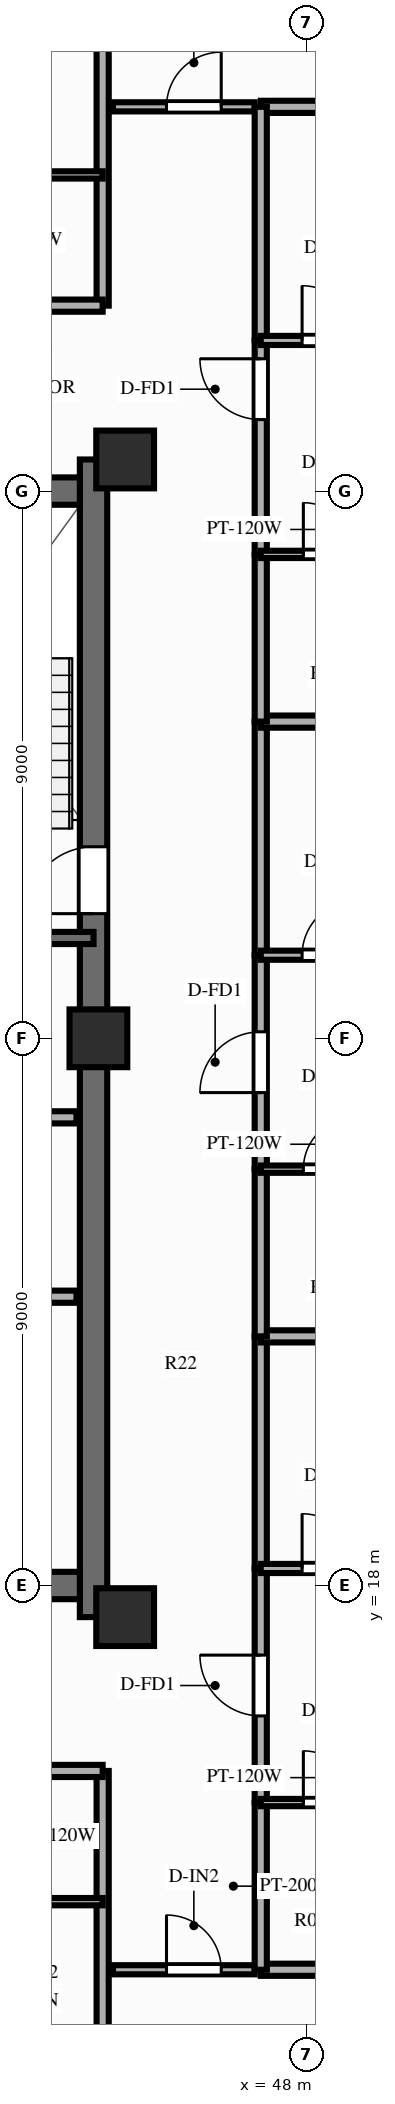
"""IFC4 building model, lengths in metres.
Left out: names, types, materials, properties, quantities, classifications, styles, units other than length and angle.
Written with IfcOpenShell. Run it as: python <this file> out.ifc"""

import sys

from ifc_helpers import new_model, si_unit, direction, frame, frame_2d, origin, origin_2d, place, context, subcontext, project, spatial, rectangle, extrude, source, transform, mapped, element, fill, save


model = new_model("IFC4")
c1 = context("Model", 3, precision=1e-05, world=origin(), true_north=direction((0.0, 1.0)))
c2 = subcontext(c1, "Body", "Model", "MODEL_VIEW")
j1 = project(units=[si_unit("LENGTHUNIT", "METRE"), si_unit("PLANEANGLEUNIT", "RADIAN")], contexts=[c1])
p1 = place(None, origin())
s1 = spatial("IfcSite", under=j1, at=p1, CompositionType="ELEMENT")
p2 = place(p1, origin())
s2 = spatial("IfcBuilding", under=s1, at=p2, CompositionType="ELEMENT")
p3 = place(p2, frame((0.0, 0.0, 236.1)))
s3 = spatial("IfcBuildingStorey", under=s2, at=p3, CompositionType="ELEMENT", Elevation=236.1)
p4 = place(p3, frame((44.5, 17.48, 0.0), z_axis=(0.0, 0.0, 1.0), x_axis=(0.0, 1.0, 0.0)))
e1 = element("IfcWall", 1, at=p4, inside=s3, PredefinedType="SHEAR", context=c2, shape_type="SweptSolid", body=[
    extrude(rectangle(XDim=19.04, YDim=0.45, at=frame_2d((9.52, 0.0))), origin(), (0.0, 0.0, 1.0), 3.9),
])
p5 = place(p4, frame((12.67, 0.0, 0.0), z_axis=(0.0, 0.0, 1.0), x_axis=(-1.0, 0.0, 0.0)))
e2 = element("IfcOpeningElement", 2, at=p5, cuts=e1, PredefinedType="OPENING", context=c2, shape_type="SweptSolid", body=[
    extrude(rectangle(XDim=1.1, YDim=2.15, at=frame_2d((0.55, 1.075))), frame((0.0, 0.237, 0.0), z_axis=(0.0, -1.0, 0.0), x_axis=(1.0, 0.0, 0.0)), (0.0, 0.0, 1.0), 0.474),
])
p6 = place(p3, frame((31.725, 18.0, 0.0), z_axis=(0.0, 0.0, 1.0), x_axis=(1.0, 0.0, 0.0)))
e3 = element("IfcWall", 3, at=p6, inside=s3, PredefinedType="SHEAR", context=c2, shape_type="SweptSolid", body=[
    extrude(rectangle(XDim=12.55, YDim=0.45, at=frame_2d((6.275, 0.0))), origin(), (0.0, 0.0, 1.0), 3.9),
])
p7 = place(p3, frame((31.725, 36.0, 0.0), z_axis=(0.0, 0.0, 1.0), x_axis=(1.0, 0.0, 0.0)))
e4 = element("IfcWall", 4, at=p7, inside=s3, PredefinedType="SHEAR", context=c2, shape_type="SweptSolid", body=[
    extrude(rectangle(XDim=12.55, YDim=0.45, at=frame_2d((6.275, 0.0))), origin(), (0.0, 0.0, 1.0), 3.9),
])
p8 = place(p7, frame((5.225, 0.0, 0.0), z_axis=(0.0, 0.0, 1.0), x_axis=(-1.0, 0.0, 0.0)))
e5 = element("IfcOpeningElement", 5, at=p8, cuts=e4, PredefinedType="OPENING", context=c2, shape_type="SweptSolid", body=[
    extrude(rectangle(XDim=1.4, YDim=2.15, at=frame_2d((0.7, 1.075))), frame((0.0, 0.237, 0.0), z_axis=(0.0, -1.0, 0.0), x_axis=(1.0, 0.0, 0.0)), (0.0, 0.0, 1.0), 0.474),
])
m1 = source(origin(), c2, "Body", "SweptSolid", [
    extrude(rectangle(XDim=0.95, YDim=0.95, at=origin_2d()), origin(), (0.0, 0.0, 1.0), 3.9),
])
for number, where, z_axis, x_axis in (
    (6, (45.02, 17.48, 0.0), (0.0, 0.0, 1.0), (1.0, 0.0, 0.0)),
    (7, (45.02, 36.52, 0.0), (0.0, 0.0, 1.0), (1.0, 0.0, 0.0)),
    (8, (44.58, 27.0, 0.0), (0.0, 0.0, 1.0), (1.0, 0.0, 0.0)),
):
    element("IfcColumn", number, at=place(p3, frame(where, z_axis=z_axis, x_axis=x_axis)), inside=s3, PredefinedType="COLUMN", context=c2, shape_type="MappedRepresentation", body=[
        mapped(m1, transform((0.0, 0.0, 0.0), scale=1.0)),
    ])
p9 = place(p3, frame((41.55, 22.75, 0.0), z_axis=(0.0, 0.0, 1.0), x_axis=(1.0, 0.0, 0.0)))
e9 = element("IfcWall", 9, at=p9, inside=s3, PredefinedType="PARTITIONING", context=c2, shape_type="SweptSolid", body=[
    extrude(rectangle(XDim=2.67, YDim=0.2, at=frame_2d((1.335, 0.0))), origin(), (0.0, 0.0, 1.0), 3.56),
])
p10 = place(p3, frame((41.55, 25.7, 0.0), z_axis=(0.0, 0.0, 1.0), x_axis=(1.0, 0.0, 0.0)))
e10 = element("IfcWall", 10, at=p10, inside=s3, PredefinedType="PARTITIONING", context=c2, shape_type="SweptSolid", body=[
    extrude(rectangle(XDim=2.67, YDim=0.2, at=frame_2d((1.335, 0.0))), origin(), (0.0, 0.0, 1.0), 3.04),
])
p11 = place(p3, frame((40.57, 28.65, 0.0), z_axis=(0.0, 0.0, 1.0), x_axis=(1.0, 0.0, 0.0)))
e11 = element("IfcWall", 11, at=p11, inside=s3, PredefinedType="SOLIDWALL", context=c2, shape_type="SweptSolid", body=[
    extrude(rectangle(XDim=3.93, YDim=0.2, at=frame_2d((1.965, 0.0))), origin(), (0.0, 0.0, 1.0), 3.69),
])
p12 = place(p3, frame((44.82, 11.68, 0.0), z_axis=(0.0, 0.0, 1.0), x_axis=(1.0, 0.0, 0.0)))
e12 = element("IfcWall", 12, at=p12, inside=s3, PredefinedType="PARTITIONING", context=c2, shape_type="SweptSolid", body=[
    extrude(rectangle(XDim=2.33, YDim=0.15, at=frame_2d((1.165, 0.0))), origin(), (0.0, 0.0, 1.0), 2.24),
])
p13 = place(p12, frame((0.88, 0.0, 0.0)))
e13 = element("IfcOpeningElement", 13, at=p13, cuts=e12, PredefinedType="OPENING", context=c2, shape_type="SweptSolid", body=[
    extrude(rectangle(XDim=0.9, YDim=2.1, at=frame_2d((0.45, 1.05))), frame((0.0, 0.087, 0.0), z_axis=(0.0, -1.0, 0.0), x_axis=(1.0, 0.0, 0.0)), (0.0, 0.0, 1.0), 0.174),
])
p14 = place(p3, frame((44.82, 42.32, 0.0), z_axis=(0.0, 0.0, 1.0), x_axis=(1.0, 0.0, 0.0)))
e14 = element("IfcWall", 14, at=p14, inside=s3, PredefinedType="PARTITIONING", context=c2, shape_type="SweptSolid", body=[
    extrude(rectangle(XDim=2.33, YDim=0.15, at=frame_2d((1.165, 0.0))), origin(), (0.0, 0.0, 1.0), 2.24),
])
p15 = place(p14, frame((0.88, 0.0, 0.0)))
e15 = element("IfcOpeningElement", 15, at=p15, cuts=e14, PredefinedType="OPENING", context=c2, shape_type="SweptSolid", body=[
    extrude(rectangle(XDim=0.9, YDim=2.1, at=frame_2d((0.45, 1.05))), frame((0.0, 0.087, 0.0), z_axis=(0.0, -1.0, 0.0), x_axis=(1.0, 0.0, 0.0)), (0.0, 0.0, 1.0), 0.174),
])
p16 = place(p3, frame((44.65, 14.95, 0.0), z_axis=(0.0, 0.0, 1.0), x_axis=(0.0, -1.0, 0.0)))
e16 = element("IfcWall", 16, at=p16, inside=s3, PredefinedType="PARTITIONING", context=c2, shape_type="SweptSolid", body=[
    extrude(rectangle(XDim=8.8, YDim=0.2, at=frame_2d((4.4, 0.0))), origin(), (0.0, 0.0, 1.0), 2.44),
])
p17 = place(p3, frame((41.8, 14.95, 0.0), z_axis=(0.0, 0.0, 1.0), x_axis=(1.0, 0.0, 0.0)))
e17 = element("IfcWall", 17, at=p17, inside=s3, PredefinedType="PARTITIONING", context=c2, shape_type="SweptSolid", body=[
    extrude(rectangle(XDim=2.85, YDim=0.2, at=frame_2d((1.425, 0.0))), origin(), (0.0, 0.0, 1.0), 3.56),
])
p18 = place(p3, frame((41.8, 12.8, 0.0), z_axis=(0.0, 0.0, 1.0), x_axis=(1.0, 0.0, 0.0)))
e18 = element("IfcWall", 18, at=p18, inside=s3, PredefinedType="PARTITIONING", context=c2, shape_type="SweptSolid", body=[
    extrude(rectangle(XDim=2.85, YDim=0.12, at=frame_2d((1.425, 0.0))), origin(), (0.0, 0.0, 1.0), 3.56),
])
p19 = place(p3, frame((44.65, 39.05, 0.0), z_axis=(0.0, 0.0, 1.0), x_axis=(0.0, 1.0, 0.0)))
e19 = element("IfcWall", 19, at=p19, inside=s3, PredefinedType="PARTITIONING", context=c2, shape_type="SweptSolid", body=[
    extrude(rectangle(XDim=8.8, YDim=0.2, at=frame_2d((4.4, 0.0))), origin(), (0.0, 0.0, 1.0), 2.44),
])
p20 = place(p3, frame((42.085, 39.05, 0.0), z_axis=(0.0, 0.0, 1.0), x_axis=(1.0, 0.0, 0.0)))
e20 = element("IfcWall", 20, at=p20, inside=s3, PredefinedType="PARTITIONING", context=c2, shape_type="SweptSolid", body=[
    extrude(rectangle(XDim=2.564, YDim=0.2, at=frame_2d((1.282, 0.0))), origin(), (0.0, 0.0, 1.0), 3.56),
])
p21 = place(p3, frame((42.085, 41.2, 0.0), z_axis=(0.0, 0.0, 1.0), x_axis=(1.0, 0.0, 0.0)))
e21 = element("IfcWall", 21, at=p21, inside=s3, PredefinedType="PARTITIONING", context=c2, shape_type="SweptSolid", body=[
    extrude(rectangle(XDim=2.564, YDim=0.12, at=frame_2d((1.282, 0.0))), origin(), (0.0, 0.0, 1.0), 3.56),
])
for number, where, z_axis, x_axis in (
    (22, (47.25, 11.68, 0.0), (0.0, 0.0, 1.0), (1.0, 0.0, 0.0)),
    (23, (47.25, 42.32, 0.0), (0.0, 0.0, 1.0), (1.0, 0.0, 0.0)),
):
    element("IfcWall", number, at=place(p3, frame(where, z_axis=z_axis, x_axis=x_axis)), inside=s3, PredefinedType="PARTITIONING", context=c2, shape_type="SweptSolid", body=[
        extrude(rectangle(XDim=7.35, YDim=0.2, at=frame_2d((3.675, 0.0))), origin(), (0.0, 0.0, 1.0), 2.24),
    ])
p22 = place(p3, frame((47.25, 11.68, 0.0), z_axis=(0.0, 0.0, 1.0), x_axis=(0.0, 1.0, 0.0)))
e24 = element("IfcWall", 24, at=p22, inside=s3, PredefinedType="PARTITIONING", context=c2, shape_type="SweptSolid", body=[
    extrude(rectangle(XDim=2.75, YDim=0.2, at=frame_2d((1.375, 0.0))), origin(), (0.0, 0.0, 1.0), 2.24),
])
p23 = place(p3, frame((47.25, 14.43, 0.0), z_axis=(0.0, 0.0, 1.0), x_axis=(0.0, 1.0, 0.0)))
e25 = element("IfcWall", 25, at=p23, inside=s3, PredefinedType="PARTITIONING", context=c2, shape_type="SweptSolid", body=[
    extrude(rectangle(XDim=3.85, YDim=0.2, at=frame_2d((1.925, 0.0))), origin(), (0.0, 0.0, 1.0), 2.24),
])
p24 = place(p23, frame((1.425, 0.0, 0.0)))
e26 = element("IfcOpeningElement", 26, at=p24, cuts=e25, PredefinedType="OPENING", context=c2, shape_type="SweptSolid", body=[
    extrude(rectangle(XDim=1.0, YDim=2.15, at=frame_2d((0.5, 1.075))), frame((0.0, 0.112, 0.0), z_axis=(0.0, -1.0, 0.0), x_axis=(1.0, 0.0, 0.0)), (0.0, 0.0, 1.0), 0.224),
])
p25 = place(p3, frame((47.25, 18.28, 0.0), z_axis=(0.0, 0.0, 1.0), x_axis=(0.0, 1.0, 0.0)))
e27 = element("IfcWall", 27, at=p25, inside=s3, PredefinedType="PARTITIONING", context=c2, shape_type="SweptSolid", body=[
    extrude(rectangle(XDim=3.818, YDim=0.2, at=frame_2d((1.909, 0.0))), origin(), (0.0, 0.0, 1.0), 3.56),
])
p26 = place(p3, frame((47.25, 14.43, 0.0), z_axis=(0.0, 0.0, 1.0), x_axis=(1.0, 0.0, 0.0)))
e28 = element("IfcWall", 28, at=p26, inside=s3, PredefinedType="PARTITIONING", context=c2, shape_type="SweptSolid", body=[
    extrude(rectangle(XDim=2.12, YDim=0.12, at=frame_2d((1.06, 0.0))), origin(), (0.0, 0.0, 1.0), 3.56),
])
p27 = place(p26, frame((0.701, 0.0, 0.0)))
e29 = element("IfcOpeningElement", 29, at=p27, cuts=e28, PredefinedType="OPENING", context=c2, shape_type="SweptSolid", body=[
    extrude(rectangle(XDim=0.85, YDim=2.05, at=frame_2d((0.425, 1.025))), frame((0.0, 0.072, 0.0), z_axis=(0.0, -1.0, 0.0), x_axis=(1.0, 0.0, 0.0)), (0.0, 0.0, 1.0), 0.144),
])
p28 = place(p3, frame((47.25, 18.28, 0.0), z_axis=(0.0, 0.0, 1.0), x_axis=(1.0, 0.0, 0.0)))
e30 = element("IfcWall", 30, at=p28, inside=s3, PredefinedType="PARTITIONING", context=c2, shape_type="SweptSolid", body=[
    extrude(rectangle(XDim=3.14, YDim=0.15, at=frame_2d((1.57, 0.0))), origin(), (0.0, 0.0, 1.0), 3.56),
])
p29 = place(p28, frame((0.68, 0.0, 0.0)))
e31 = element("IfcOpeningElement", 31, at=p29, cuts=e30, PredefinedType="OPENING", context=c2, shape_type="SweptSolid", body=[
    extrude(rectangle(XDim=0.9, YDim=2.1, at=frame_2d((0.45, 1.05))), frame((0.0, 0.087, 0.0), z_axis=(0.0, -1.0, 0.0), x_axis=(1.0, 0.0, 0.0)), (0.0, 0.0, 1.0), 0.174),
])
p30 = place(p3, frame((47.25, 22.098, 0.0), z_axis=(0.0, 0.0, 1.0), x_axis=(1.0, 0.0, 0.0)))
e32 = element("IfcWall", 32, at=p30, inside=s3, PredefinedType="PARTITIONING", context=c2, shape_type="SweptSolid", body=[
    extrude(rectangle(XDim=7.35, YDim=0.2, at=frame_2d((3.675, 0.0))), origin(), (0.0, 0.0, 1.0), 3.29),
])
p31 = place(p3, frame((47.25, 22.098, 0.0), z_axis=(0.0, 0.0, 1.0), x_axis=(0.0, 1.0, 0.0)))
e33 = element("IfcWall", 33, at=p31, inside=s3, PredefinedType="PARTITIONING", context=c2, shape_type="SweptSolid", body=[
    extrude(rectangle(XDim=2.75, YDim=0.2, at=frame_2d((1.375, 0.0))), origin(), (0.0, 0.0, 1.0), 3.56),
])
p32 = place(p3, frame((47.25, 24.848, 0.0), z_axis=(0.0, 0.0, 1.0), x_axis=(0.0, 1.0, 0.0)))
e34 = element("IfcWall", 34, at=p32, inside=s3, PredefinedType="PARTITIONING", context=c2, shape_type="SweptSolid", body=[
    extrude(rectangle(XDim=3.519, YDim=0.2, at=frame_2d((1.759, 0.0))), origin(), (0.0, 0.0, 1.0), 3.56),
])
p33 = place(p32, frame((1.26, 0.0, 0.0)))
e35 = element("IfcOpeningElement", 35, at=p33, cuts=e34, PredefinedType="OPENING", context=c2, shape_type="SweptSolid", body=[
    extrude(rectangle(XDim=1.0, YDim=2.15, at=frame_2d((0.5, 1.075))), frame((0.0, 0.112, 0.0), z_axis=(0.0, -1.0, 0.0), x_axis=(1.0, 0.0, 0.0)), (0.0, 0.0, 1.0), 0.224),
])
p34 = place(p3, frame((47.25, 28.366, 0.0), z_axis=(0.0, 0.0, 1.0), x_axis=(0.0, 1.0, 0.0)))
e36 = element("IfcWall", 36, at=p34, inside=s3, PredefinedType="PARTITIONING", context=c2, shape_type="SweptSolid", body=[
    extrude(rectangle(XDim=3.842, YDim=0.2, at=frame_2d((1.921, 0.0))), origin(), (0.0, 0.0, 1.0), 3.56),
])
p35 = place(p3, frame((47.25, 24.848, 0.0), z_axis=(0.0, 0.0, 1.0), x_axis=(1.0, 0.0, 0.0)))
e37 = element("IfcWall", 37, at=p35, inside=s3, PredefinedType="PARTITIONING", context=c2, shape_type="SweptSolid", body=[
    extrude(rectangle(XDim=2.12, YDim=0.12, at=frame_2d((1.06, 0.0))), origin(), (0.0, 0.0, 1.0), 3.56),
])
p36 = place(p35, frame((0.701, 0.0, 0.0)))
e38 = element("IfcOpeningElement", 38, at=p36, cuts=e37, PredefinedType="OPENING", context=c2, shape_type="SweptSolid", body=[
    extrude(rectangle(XDim=0.85, YDim=2.05, at=frame_2d((0.425, 1.025))), frame((0.0, 0.072, 0.0), z_axis=(0.0, -1.0, 0.0), x_axis=(1.0, 0.0, 0.0)), (0.0, 0.0, 1.0), 0.144),
])
p37 = place(p3, frame((47.25, 28.366, 0.0), z_axis=(0.0, 0.0, 1.0), x_axis=(1.0, 0.0, 0.0)))
e39 = element("IfcWall", 39, at=p37, inside=s3, PredefinedType="PARTITIONING", context=c2, shape_type="SweptSolid", body=[
    extrude(rectangle(XDim=3.14, YDim=0.15, at=frame_2d((1.57, 0.0))), origin(), (0.0, 0.0, 1.0), 3.56),
])
p38 = place(p37, frame((0.68, 0.0, 0.0)))
e40 = element("IfcOpeningElement", 40, at=p38, cuts=e39, PredefinedType="OPENING", context=c2, shape_type="SweptSolid", body=[
    extrude(rectangle(XDim=0.9, YDim=2.1, at=frame_2d((0.45, 1.05))), frame((0.0, 0.087, 0.0), z_axis=(0.0, -1.0, 0.0), x_axis=(1.0, 0.0, 0.0)), (0.0, 0.0, 1.0), 0.174),
])
p39 = place(p3, frame((47.25, 32.209, 0.0), z_axis=(0.0, 0.0, 1.0), x_axis=(1.0, 0.0, 0.0)))
e41 = element("IfcWall", 41, at=p39, inside=s3, PredefinedType="PARTITIONING", context=c2, shape_type="SweptSolid", body=[
    extrude(rectangle(XDim=7.35, YDim=0.2, at=frame_2d((3.675, 0.0))), origin(), (0.0, 0.0, 1.0), 3.29),
])
p40 = place(p3, frame((47.25, 32.209, 0.0), z_axis=(0.0, 0.0, 1.0), x_axis=(0.0, 1.0, 0.0)))
e42 = element("IfcWall", 42, at=p40, inside=s3, PredefinedType="PARTITIONING", context=c2, shape_type="SweptSolid", body=[
    extrude(rectangle(XDim=2.75, YDim=0.2, at=frame_2d((1.375, 0.0))), origin(), (0.0, 0.0, 1.0), 3.56),
])
p41 = place(p3, frame((47.25, 34.959, 0.0), z_axis=(0.0, 0.0, 1.0), x_axis=(0.0, 1.0, 0.0)))
e43 = element("IfcWall", 43, at=p41, inside=s3, PredefinedType="PARTITIONING", context=c2, shape_type="SweptSolid", body=[
    extrude(rectangle(XDim=3.519, YDim=0.2, at=frame_2d((1.76, 0.0))), origin(), (0.0, 0.0, 1.0), 2.24),
])
p42 = place(p41, frame((2.217, 0.0, 0.0)))
e44 = element("IfcOpeningElement", 44, at=p42, cuts=e43, PredefinedType="OPENING", context=c2, shape_type="SweptSolid", body=[
    extrude(rectangle(XDim=1.0, YDim=2.15, at=frame_2d((0.5, 1.075))), frame((0.0, 0.112, 0.0), z_axis=(0.0, -1.0, 0.0), x_axis=(1.0, 0.0, 0.0)), (0.0, 0.0, 1.0), 0.224),
])
p43 = place(p3, frame((47.25, 38.478, 0.0), z_axis=(0.0, 0.0, 1.0), x_axis=(0.0, 1.0, 0.0)))
e45 = element("IfcWall", 45, at=p43, inside=s3, PredefinedType="PARTITIONING", context=c2, shape_type="SweptSolid", body=[
    extrude(rectangle(XDim=3.842, YDim=0.2, at=frame_2d((1.921, 0.0))), origin(), (0.0, 0.0, 1.0), 2.24),
])
p44 = place(p3, frame((47.25, 34.959, 0.0), z_axis=(0.0, 0.0, 1.0), x_axis=(1.0, 0.0, 0.0)))
e46 = element("IfcWall", 46, at=p44, inside=s3, PredefinedType="PARTITIONING", context=c2, shape_type="SweptSolid", body=[
    extrude(rectangle(XDim=2.12, YDim=0.12, at=frame_2d((1.06, 0.0))), origin(), (0.0, 0.0, 1.0), 3.56),
])
p45 = place(p44, frame((0.701, 0.0, 0.0)))
e47 = element("IfcOpeningElement", 47, at=p45, cuts=e46, PredefinedType="OPENING", context=c2, shape_type="SweptSolid", body=[
    extrude(rectangle(XDim=0.85, YDim=2.05, at=frame_2d((0.425, 1.025))), frame((0.0, 0.072, 0.0), z_axis=(0.0, -1.0, 0.0), x_axis=(1.0, 0.0, 0.0)), (0.0, 0.0, 1.0), 0.144),
])
p46 = place(p3, frame((47.25, 38.478, 0.0), z_axis=(0.0, 0.0, 1.0), x_axis=(1.0, 0.0, 0.0)))
e48 = element("IfcWall", 48, at=p46, inside=s3, PredefinedType="PARTITIONING", context=c2, shape_type="SweptSolid", body=[
    extrude(rectangle(XDim=3.14, YDim=0.15, at=frame_2d((1.57, 0.0))), origin(), (0.0, 0.0, 1.0), 3.56),
])
p47 = place(p46, frame((0.68, 0.0, 0.0)))
e49 = element("IfcOpeningElement", 49, at=p47, cuts=e48, PredefinedType="OPENING", context=c2, shape_type="SweptSolid", body=[
    extrude(rectangle(XDim=0.9, YDim=2.1, at=frame_2d((0.45, 1.05))), frame((0.0, 0.087, 0.0), z_axis=(0.0, -1.0, 0.0), x_axis=(1.0, 0.0, 0.0)), (0.0, 0.0, 1.0), 0.174),
])
m2 = source(origin(), c2, "Body", "SweptSolid", [
    extrude(rectangle(XDim=1.1, YDim=2.15, at=frame_2d((0.55, 1.075))), frame((0.0, 0.025, 0.0), z_axis=(0.0, -1.0, 0.0), x_axis=(1.0, 0.0, 0.0)), (0.0, 0.0, 1.0), 0.05),
])
p48 = place(p5, origin())
e50 = element("IfcDoor", 50, at=p48, inside=s3, OperationType="SINGLE_SWING_RIGHT", PredefinedType="DOOR", context=c2, shape_type="MappedRepresentation", body=[
    mapped(m2, transform((0.0, 0.0, 0.0), scale=1.0)),
])
fill(e2, e50)
m3 = source(origin(), c2, "Body", "SweptSolid", [
    extrude(rectangle(XDim=0.9, YDim=2.1, at=frame_2d((0.45, 1.05))), frame((0.0, 0.025, 0.0), z_axis=(0.0, -1.0, 0.0), x_axis=(1.0, 0.0, 0.0)), (0.0, 0.0, 1.0), 0.05),
])
p49 = place(p13, origin())
e51 = element("IfcDoor", 51, at=p49, inside=s3, OperationType="SINGLE_SWING_LEFT", PredefinedType="DOOR", context=c2, shape_type="MappedRepresentation", body=[
    mapped(m3, transform((0.0, 0.0, 0.0), scale=1.0)),
])
fill(e13, e51)
p50 = place(p15, origin())
e52 = element("IfcDoor", 52, at=p50, inside=s3, OperationType="SINGLE_SWING_RIGHT", PredefinedType="DOOR", context=c2, shape_type="MappedRepresentation", body=[
    mapped(m3, transform((0.0, 0.0, 0.0), scale=1.0)),
])
fill(e15, e52)
m4 = source(origin(), c2, "Body", "SweptSolid", [
    extrude(rectangle(XDim=1.0, YDim=2.15, at=frame_2d((0.5, 1.075))), frame((0.0, 0.025, 0.0), z_axis=(0.0, -1.0, 0.0), x_axis=(1.0, 0.0, 0.0)), (0.0, 0.0, 1.0), 0.05),
])
p51 = place(p24, origin())
e53 = element("IfcDoor", 53, at=p51, inside=s3, OperationType="SINGLE_SWING_RIGHT", PredefinedType="DOOR", context=c2, shape_type="MappedRepresentation", body=[
    mapped(m4, transform((0.0, 0.0, 0.0), scale=1.0)),
])
fill(e26, e53)
m5 = source(origin(), c2, "Body", "SweptSolid", [
    extrude(rectangle(XDim=0.85, YDim=2.05, at=frame_2d((0.425, 1.025))), frame((0.0, 0.025, 0.0), z_axis=(0.0, -1.0, 0.0), x_axis=(1.0, 0.0, 0.0)), (0.0, 0.0, 1.0), 0.05),
])
p52 = place(p27, origin())
e54 = element("IfcDoor", 54, at=p52, inside=s3, OperationType="SINGLE_SWING_LEFT", PredefinedType="DOOR", context=c2, shape_type="MappedRepresentation", body=[
    mapped(m5, transform((0.0, 0.0, 0.0), scale=1.0)),
])
fill(e29, e54)
p53 = place(p29, origin())
e55 = element("IfcDoor", 55, at=p53, inside=s3, OperationType="SINGLE_SWING_LEFT", PredefinedType="DOOR", context=c2, shape_type="MappedRepresentation", body=[
    mapped(m3, transform((0.0, 0.0, 0.0), scale=1.0)),
])
fill(e31, e55)
p54 = place(p33, origin())
e56 = element("IfcDoor", 56, at=p54, inside=s3, OperationType="SINGLE_SWING_LEFT", PredefinedType="DOOR", context=c2, shape_type="MappedRepresentation", body=[
    mapped(m4, transform((0.0, 0.0, 0.0), scale=1.0)),
])
fill(e35, e56)
p55 = place(p36, origin())
e57 = element("IfcDoor", 57, at=p55, inside=s3, OperationType="SINGLE_SWING_RIGHT", PredefinedType="DOOR", context=c2, shape_type="MappedRepresentation", body=[
    mapped(m5, transform((0.0, 0.0, 0.0), scale=1.0)),
])
fill(e38, e57)
p56 = place(p38, origin())
e58 = element("IfcDoor", 58, at=p56, inside=s3, OperationType="SINGLE_SWING_RIGHT", PredefinedType="DOOR", context=c2, shape_type="MappedRepresentation", body=[
    mapped(m3, transform((0.0, 0.0, 0.0), scale=1.0)),
])
fill(e40, e58)
p57 = place(p42, origin())
e59 = element("IfcDoor", 59, at=p57, inside=s3, OperationType="SINGLE_SWING_RIGHT", PredefinedType="DOOR", context=c2, shape_type="MappedRepresentation", body=[
    mapped(m4, transform((0.0, 0.0, 0.0), scale=1.0)),
])
fill(e44, e59)
p58 = place(p45, origin())
e60 = element("IfcDoor", 60, at=p58, inside=s3, OperationType="SINGLE_SWING_LEFT", PredefinedType="DOOR", context=c2, shape_type="MappedRepresentation", body=[
    mapped(m5, transform((0.0, 0.0, 0.0), scale=1.0)),
])
fill(e47, e60)
p59 = place(p47, origin())
e61 = element("IfcDoor", 61, at=p59, inside=s3, OperationType="SINGLE_SWING_LEFT", PredefinedType="DOOR", context=c2, shape_type="MappedRepresentation", body=[
    mapped(m3, transform((0.0, 0.0, 0.0), scale=1.0)),
])
fill(e49, e61)
save(model, sys.argv[1])
